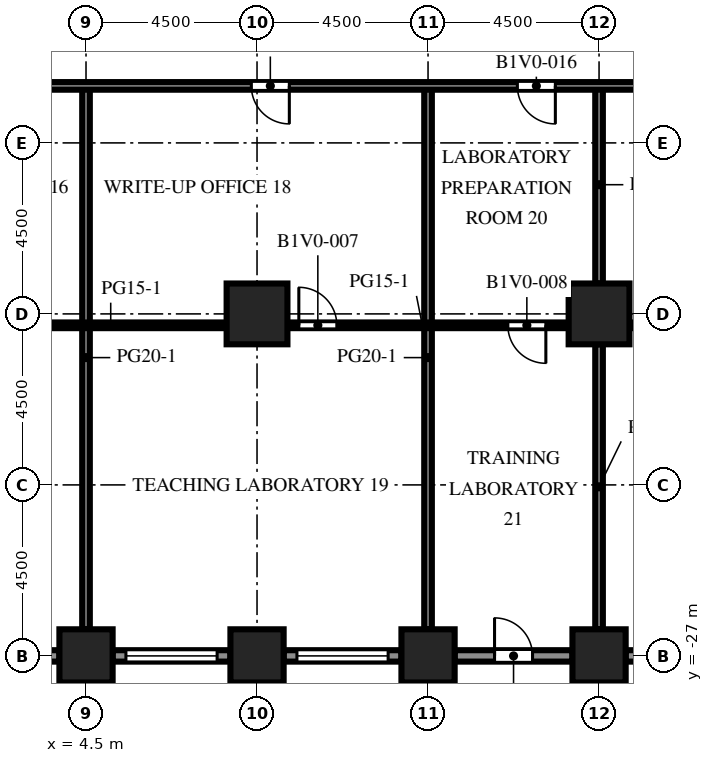
"""IFC4 building model, lengths in metres.
Left out: names, types, materials, properties, quantities, classifications, styles, units other than length and angle.
Written with IfcOpenShell. Run it as: python <this file> out.ifc"""

import sys

from ifc_helpers import new_model, si_unit, direction, frame, frame_2d, origin, origin_2d, place, context, subcontext, project, spatial, rectangle, extrude, element, fill, save


model = new_model("IFC4")
c1 = context("Model", 3, precision=1e-05, world=origin(), true_north=direction((0.0, 1.0)))
c2 = subcontext(c1, "Body", "Model", "MODEL_VIEW")
j1 = project(units=[si_unit("LENGTHUNIT", "METRE"), si_unit("PLANEANGLEUNIT", "RADIAN")], contexts=[c1])
p1 = place(None, origin())
s1 = spatial("IfcSite", under=j1, at=p1, CompositionType="ELEMENT")
p2 = place(p1, origin())
s2 = spatial("IfcBuilding", under=s1, at=p2, CompositionType="ELEMENT")
p3 = place(p2, frame((0.0, 0.0, 15.4)))
s3 = spatial("IfcBuildingStorey", under=s2, at=p3, CompositionType="ELEMENT", Elevation=15.4)
for number, where, z_axis, x_axis in (
    (1, (4.5, -27.0, 0.0), (0.0, 0.0, 1.0), (1.0, 0.0, 0.0)),
    (2, (9.0, -27.0, 0.0), (0.0, 0.0, 1.0), (1.0, 0.0, 0.0)),
    (3, (13.5, -27.0, 0.0), (0.0, 0.0, 1.0), (1.0, 0.0, 0.0)),
    (4, (18.0, -27.0, 0.0), (0.0, 0.0, 1.0), (1.0, 0.0, 0.0)),
):
    element("IfcColumn", number, at=place(p3, frame(where, z_axis=z_axis, x_axis=x_axis)), inside=s3, PredefinedType="COLUMN", context=c2, shape_type="SweptSolid", body=[
        extrude(rectangle(XDim=1.4, YDim=1.4, at=origin_2d()), origin(), (0.0, 0.0, 1.0), 4.1),
    ])
for number, where, z_axis, x_axis in (
    (5, (9.0, -18.0, 0.0), (0.0, 0.0, 1.0), (1.0, 0.0, 0.0)),
    (6, (18.0, -18.0, 0.0), (0.0, 0.0, 1.0), (1.0, 0.0, 0.0)),
):
    element("IfcColumn", number, at=place(p3, frame(where, z_axis=z_axis, x_axis=x_axis)), inside=s3, PredefinedType="COLUMN", context=c2, shape_type="SweptSolid", body=[
        extrude(rectangle(XDim=1.6, YDim=1.6, at=origin_2d()), origin(), (0.0, 0.0, 1.0), 4.1),
    ])
p4 = place(p3, frame((3.8, -27.0, 0.0), z_axis=(0.0, 0.0, 1.0), x_axis=(-1.0, 0.0, 0.0)))
e7 = element("IfcWall", 7, at=p4, inside=s3, PredefinedType="SOLIDWALL", context=c2, shape_type="SweptSolid", body=[
    extrude(rectangle(XDim=3.1, YDim=0.3, at=frame_2d((1.55, 0.0))), origin(), (0.0, 0.0, 1.0), 2.75),
])
p5 = place(p4, frame((0.35, 0.0, 0.8)))
e8 = element("IfcOpeningElement", 8, at=p5, cuts=e7, PredefinedType="OPENING", context=c2, shape_type="SweptSolid", body=[
    extrude(rectangle(XDim=2.4, YDim=1.7, at=frame_2d((1.2, 0.85))), frame((0.0, 0.16, 0.0), z_axis=(0.0, -1.0, 0.0), x_axis=(1.0, 0.0, 0.0)), (0.0, 0.0, 1.0), 0.32),
])
p6 = place(p3, frame((8.3, -27.0, 0.0), z_axis=(0.0, 0.0, 1.0), x_axis=(-1.0, 0.0, 0.0)))
e9 = element("IfcWall", 9, at=p6, inside=s3, PredefinedType="SOLIDWALL", context=c2, shape_type="SweptSolid", body=[
    extrude(rectangle(XDim=3.1, YDim=0.3, at=frame_2d((1.55, 0.0))), origin(), (0.0, 0.0, 1.0), 2.75),
])
p7 = place(p6, frame((0.35, 0.0, 0.8)))
e10 = element("IfcOpeningElement", 10, at=p7, cuts=e9, PredefinedType="OPENING", context=c2, shape_type="SweptSolid", body=[
    extrude(rectangle(XDim=2.4, YDim=1.7, at=frame_2d((1.2, 0.85))), frame((0.0, 0.16, 0.0), z_axis=(0.0, -1.0, 0.0), x_axis=(1.0, 0.0, 0.0)), (0.0, 0.0, 1.0), 0.32),
])
p8 = place(p3, frame((12.8, -27.0, 0.0), z_axis=(0.0, 0.0, 1.0), x_axis=(-1.0, 0.0, 0.0)))
e11 = element("IfcWall", 11, at=p8, inside=s3, PredefinedType="SOLIDWALL", context=c2, shape_type="SweptSolid", body=[
    extrude(rectangle(XDim=3.1, YDim=0.3, at=frame_2d((1.55, 0.0))), origin(), (0.0, 0.0, 1.0), 2.75),
])
p9 = place(p8, frame((0.35, 0.0, 0.8)))
e12 = element("IfcOpeningElement", 12, at=p9, cuts=e11, PredefinedType="OPENING", context=c2, shape_type="SweptSolid", body=[
    extrude(rectangle(XDim=2.4, YDim=1.7, at=frame_2d((1.2, 0.85))), frame((0.0, 0.16, 0.0), z_axis=(0.0, -1.0, 0.0), x_axis=(1.0, 0.0, 0.0)), (0.0, 0.0, 1.0), 0.32),
])
p10 = place(p3, frame((17.3, -27.0, 0.0), z_axis=(0.0, 0.0, 1.0), x_axis=(-1.0, 0.0, 0.0)))
e13 = element("IfcWall", 13, at=p10, inside=s3, PredefinedType="SOLIDWALL", context=c2, shape_type="SweptSolid", body=[
    extrude(rectangle(XDim=3.1, YDim=0.3, at=frame_2d((1.55, 0.0))), origin(), (0.0, 0.0, 1.0), 2.75),
])
p11 = place(p10, frame((1.05, 0.0, 0.0)))
e14 = element("IfcOpeningElement", 14, at=p11, cuts=e13, PredefinedType="OPENING", context=c2, shape_type="SweptSolid", body=[
    extrude(rectangle(XDim=1.0, YDim=2.2, at=frame_2d((0.5, 1.1))), frame((0.0, 0.16, 0.0), z_axis=(0.0, -1.0, 0.0), x_axis=(1.0, 0.0, 0.0)), (0.0, 0.0, 1.0), 0.32),
])
p12 = place(p3, frame((21.8, -27.0, 0.0), z_axis=(0.0, 0.0, 1.0), x_axis=(-1.0, 0.0, 0.0)))
e15 = element("IfcWall", 15, at=p12, inside=s3, PredefinedType="SOLIDWALL", context=c2, shape_type="SweptSolid", body=[
    extrude(rectangle(XDim=3.1, YDim=0.3, at=frame_2d((1.55, 0.0))), origin(), (0.0, 0.0, 1.0), 2.75),
])
p13 = place(p12, frame((0.35, 0.0, 0.8)))
e16 = element("IfcOpeningElement", 16, at=p13, cuts=e15, PredefinedType="OPENING", context=c2, shape_type="SweptSolid", body=[
    extrude(rectangle(XDim=2.4, YDim=1.7, at=frame_2d((1.2, 0.85))), frame((0.0, 0.16, 0.0), z_axis=(0.0, -1.0, 0.0), x_axis=(1.0, 0.0, 0.0)), (0.0, 0.0, 1.0), 0.32),
])
for number, where, z_axis, x_axis in (
    (17, (4.5, -26.3, 0.0), (0.0, 0.0, 1.0), (0.0, 1.0, 0.0)),
    (18, (13.5, -26.3, 0.0), (0.0, 0.0, 1.0), (0.0, 1.0, 0.0)),
):
    element("IfcWall", number, at=place(p3, frame(where, z_axis=z_axis, x_axis=x_axis)), inside=s3, PredefinedType="PARTITIONING", context=c2, shape_type="SweptSolid", body=[
        extrude(rectangle(XDim=14.3, YDim=0.2, at=frame_2d((7.15, 0.0))), origin(), (0.0, 0.0, 1.0), 3.65),
    ])
p14 = place(p3, frame((18.0, -26.3, 0.0), z_axis=(0.0, 0.0, 1.0), x_axis=(0.0, 1.0, 0.0)))
e19 = element("IfcWall", 19, at=p14, inside=s3, PredefinedType="PARTITIONING", context=c2, shape_type="SweptSolid", body=[
    extrude(rectangle(XDim=7.5, YDim=0.2, at=frame_2d((3.75, 0.0))), origin(), (0.0, 0.0, 1.0), 3.65),
])
p15 = place(p3, frame((18.0, -17.2, 0.0), z_axis=(0.0, 0.0, 1.0), x_axis=(0.0, 1.0, 0.0)))
e20 = element("IfcWall", 20, at=p15, inside=s3, PredefinedType="PARTITIONING", context=c2, shape_type="SweptSolid", body=[
    extrude(rectangle(XDim=5.2, YDim=0.2, at=frame_2d((2.6, 0.0))), origin(), (0.0, 0.0, 1.0), 3.65),
])
p16 = place(p3, frame((8.2, -18.3, 0.0), z_axis=(0.0, 0.0, 1.0), x_axis=(-1.0, 0.0, 0.0)))
e21 = element("IfcWall", 21, at=p16, inside=s3, PredefinedType="PARTITIONING", context=c2, shape_type="SweptSolid", body=[
    extrude(rectangle(XDim=7.4, YDim=0.15, at=frame_2d((3.7, 0.0))), origin(), (0.0, 0.0, 1.0), 3.65),
])
p17 = place(p16, frame((6.1, 0.0, 0.0)))
e22 = element("IfcOpeningElement", 22, at=p17, cuts=e21, PredefinedType="OPENING", context=c2, shape_type="SweptSolid", body=[
    extrude(rectangle(XDim=1.0, YDim=2.1, at=frame_2d((0.5, 1.05))), frame((0.0, 0.085, 0.0), z_axis=(0.0, -1.0, 0.0), x_axis=(1.0, 0.0, 0.0)), (0.0, 0.0, 1.0), 0.17),
])
p18 = place(p3, frame((17.2, -18.3, 0.0), z_axis=(0.0, 0.0, 1.0), x_axis=(-1.0, 0.0, 0.0)))
e23 = element("IfcWall", 23, at=p18, inside=s3, PredefinedType="PARTITIONING", context=c2, shape_type="SweptSolid", body=[
    extrude(rectangle(XDim=7.4, YDim=0.15, at=frame_2d((3.7, 0.0))), origin(), (0.0, 0.0, 1.0), 3.65),
])
p19 = place(p18, frame((6.1, 0.0, 0.0)))
e24 = element("IfcOpeningElement", 24, at=p19, cuts=e23, PredefinedType="OPENING", context=c2, shape_type="SweptSolid", body=[
    extrude(rectangle(XDim=1.0, YDim=2.1, at=frame_2d((0.5, 1.05))), frame((0.0, 0.085, 0.0), z_axis=(0.0, -1.0, 0.0), x_axis=(1.0, 0.0, 0.0)), (0.0, 0.0, 1.0), 0.17),
])
p20 = place(p18, frame((0.6, 0.0, 0.0)))
e25 = element("IfcOpeningElement", 25, at=p20, cuts=e23, PredefinedType="OPENING", context=c2, shape_type="SweptSolid", body=[
    extrude(rectangle(XDim=1.0, YDim=2.1, at=frame_2d((0.5, 1.05))), frame((0.0, 0.085, 0.0), z_axis=(0.0, -1.0, 0.0), x_axis=(1.0, 0.0, 0.0)), (0.0, 0.0, 1.0), 0.17),
])
p21 = place(p3, frame((18.8, -18.3, 0.0), z_axis=(0.0, 0.0, 1.0), x_axis=(1.0, 0.0, 0.0)))
e26 = element("IfcWall", 26, at=p21, inside=s3, PredefinedType="PARTITIONING", context=c2, shape_type="SweptSolid", body=[
    extrude(rectangle(XDim=2.9, YDim=0.15, at=frame_2d((1.45, 0.0))), origin(), (0.0, 0.0, 1.0), 3.65),
])
p22 = place(p3, frame((26.85, -12.0, 0.0), z_axis=(0.0, 0.0, 1.0), x_axis=(-1.0, 0.0, 0.0)))
e27 = element("IfcWall", 27, at=p22, inside=s3, PredefinedType="PARTITIONING", context=c2, shape_type="SweptSolid", body=[
    extrude(rectangle(XDim=53.7, YDim=0.2, at=frame_2d((26.85, 0.0))), origin(), (0.0, 0.0, 1.0), 3.65),
])
p23 = place(p22, frame((47.75, 0.0, 0.0)))
e28 = element("IfcOpeningElement", 28, at=p23, cuts=e27, PredefinedType="OPENING", context=c2, shape_type="SweptSolid", body=[
    extrude(rectangle(XDim=1.0, YDim=2.1, at=frame_2d((0.5, 1.05))), frame((0.0, 0.11, 0.0), z_axis=(0.0, -1.0, 0.0), x_axis=(1.0, 0.0, 0.0)), (0.0, 0.0, 1.0), 0.22),
])
p24 = place(p22, frame((39.5, 0.0, 0.0)))
e29 = element("IfcOpeningElement", 29, at=p24, cuts=e27, PredefinedType="OPENING", context=c2, shape_type="SweptSolid", body=[
    extrude(rectangle(XDim=1.0, YDim=2.1, at=frame_2d((0.5, 1.05))), frame((0.0, 0.11, 0.0), z_axis=(0.0, -1.0, 0.0), x_axis=(1.0, 0.0, 0.0)), (0.0, 0.0, 1.0), 0.22),
])
p25 = place(p22, frame((27.0, 0.0, 0.0)))
e30 = element("IfcOpeningElement", 30, at=p25, cuts=e27, PredefinedType="OPENING", context=c2, shape_type="SweptSolid", body=[
    extrude(rectangle(XDim=1.0, YDim=2.1, at=frame_2d((0.5, 1.05))), frame((0.0, 0.11, 0.0), z_axis=(0.0, -1.0, 0.0), x_axis=(1.0, 0.0, 0.0)), (0.0, 0.0, 1.0), 0.22),
])
p26 = place(p22, frame((17.0, 0.0, 0.0)))
e31 = element("IfcOpeningElement", 31, at=p26, cuts=e27, PredefinedType="OPENING", context=c2, shape_type="SweptSolid", body=[
    extrude(rectangle(XDim=1.0, YDim=2.1, at=frame_2d((0.5, 1.05))), frame((0.0, 0.11, 0.0), z_axis=(0.0, -1.0, 0.0), x_axis=(1.0, 0.0, 0.0)), (0.0, 0.0, 1.0), 0.22),
])
p27 = place(p22, frame((10.0, 0.0, 0.0)))
e32 = element("IfcOpeningElement", 32, at=p27, cuts=e27, PredefinedType="OPENING", context=c2, shape_type="SweptSolid", body=[
    extrude(rectangle(XDim=1.0, YDim=2.1, at=frame_2d((0.5, 1.05))), frame((0.0, 0.11, 0.0), z_axis=(0.0, -1.0, 0.0), x_axis=(1.0, 0.0, 0.0)), (0.0, 0.0, 1.0), 0.22),
])
p28 = place(p22, frame((4.0, 0.0, 0.0)))
e33 = element("IfcOpeningElement", 33, at=p28, cuts=e27, PredefinedType="OPENING", context=c2, shape_type="SweptSolid", body=[
    extrude(rectangle(XDim=1.0, YDim=2.1, at=frame_2d((0.5, 1.05))), frame((0.0, 0.11, 0.0), z_axis=(0.0, -1.0, 0.0), x_axis=(1.0, 0.0, 0.0)), (0.0, 0.0, 1.0), 0.22),
])
p29 = place(p7, origin())
e34 = element("IfcWindow", 34, at=p29, inside=s3, PartitioningType="SINGLE_PANEL", PredefinedType="WINDOW", context=c2, shape_type="SweptSolid", body=[
    extrude(rectangle(XDim=2.4, YDim=1.7, at=frame_2d((1.2, 0.85))), frame((0.0, 0.03, 0.0), z_axis=(0.0, -1.0, 0.0), x_axis=(1.0, 0.0, 0.0)), (0.0, 0.0, 1.0), 0.06),
])
fill(e10, e34)
p30 = place(p9, origin())
e35 = element("IfcWindow", 35, at=p30, inside=s3, PartitioningType="SINGLE_PANEL", PredefinedType="WINDOW", context=c2, shape_type="SweptSolid", body=[
    extrude(rectangle(XDim=2.4, YDim=1.7, at=frame_2d((1.2, 0.85))), frame((0.0, 0.03, 0.0), z_axis=(0.0, -1.0, 0.0), x_axis=(1.0, 0.0, 0.0)), (0.0, 0.0, 1.0), 0.06),
])
fill(e12, e35)
p31 = place(p11, origin())
e36 = element("IfcDoor", 36, at=p31, inside=s3, OperationType="SINGLE_SWING_RIGHT", PredefinedType="DOOR", context=c2, shape_type="SweptSolid", body=[
    extrude(rectangle(XDim=1.0, YDim=2.2, at=frame_2d((0.5, 1.1))), frame((0.0, 0.025, 0.0), z_axis=(0.0, -1.0, 0.0), x_axis=(1.0, 0.0, 0.0)), (0.0, 0.0, 1.0), 0.05),
])
fill(e14, e36)
p32 = place(p19, origin())
e37 = element("IfcDoor", 37, at=p32, inside=s3, OperationType="SINGLE_SWING_RIGHT", PredefinedType="DOOR", context=c2, shape_type="SweptSolid", body=[
    extrude(rectangle(XDim=1.0, YDim=2.1, at=frame_2d((0.5, 1.05))), frame((0.0, 0.025, 0.0), z_axis=(0.0, -1.0, 0.0), x_axis=(1.0, 0.0, 0.0)), (0.0, 0.0, 1.0), 0.05),
])
fill(e24, e37)
p33 = place(p20, origin())
e38 = element("IfcDoor", 38, at=p33, inside=s3, OperationType="SINGLE_SWING_LEFT", PredefinedType="DOOR", context=c2, shape_type="SweptSolid", body=[
    extrude(rectangle(XDim=1.0, YDim=2.1, at=frame_2d((0.5, 1.05))), frame((0.0, 0.025, 0.0), z_axis=(0.0, -1.0, 0.0), x_axis=(1.0, 0.0, 0.0)), (0.0, 0.0, 1.0), 0.05),
])
fill(e25, e38)
p34 = place(p26, origin())
e39 = element("IfcDoor", 39, at=p34, inside=s3, OperationType="SINGLE_SWING_LEFT", PredefinedType="DOOR", context=c2, shape_type="SweptSolid", body=[
    extrude(rectangle(XDim=1.0, YDim=2.1, at=frame_2d((0.5, 1.05))), frame((0.0, 0.025, 0.0), z_axis=(0.0, -1.0, 0.0), x_axis=(1.0, 0.0, 0.0)), (0.0, 0.0, 1.0), 0.05),
])
fill(e31, e39)
p35 = place(p27, origin())
e40 = element("IfcDoor", 40, at=p35, inside=s3, OperationType="SINGLE_SWING_LEFT", PredefinedType="DOOR", context=c2, shape_type="SweptSolid", body=[
    extrude(rectangle(XDim=1.0, YDim=2.1, at=frame_2d((0.5, 1.05))), frame((0.0, 0.025, 0.0), z_axis=(0.0, -1.0, 0.0), x_axis=(1.0, 0.0, 0.0)), (0.0, 0.0, 1.0), 0.05),
])
fill(e32, e40)
save(model, sys.argv[1])
